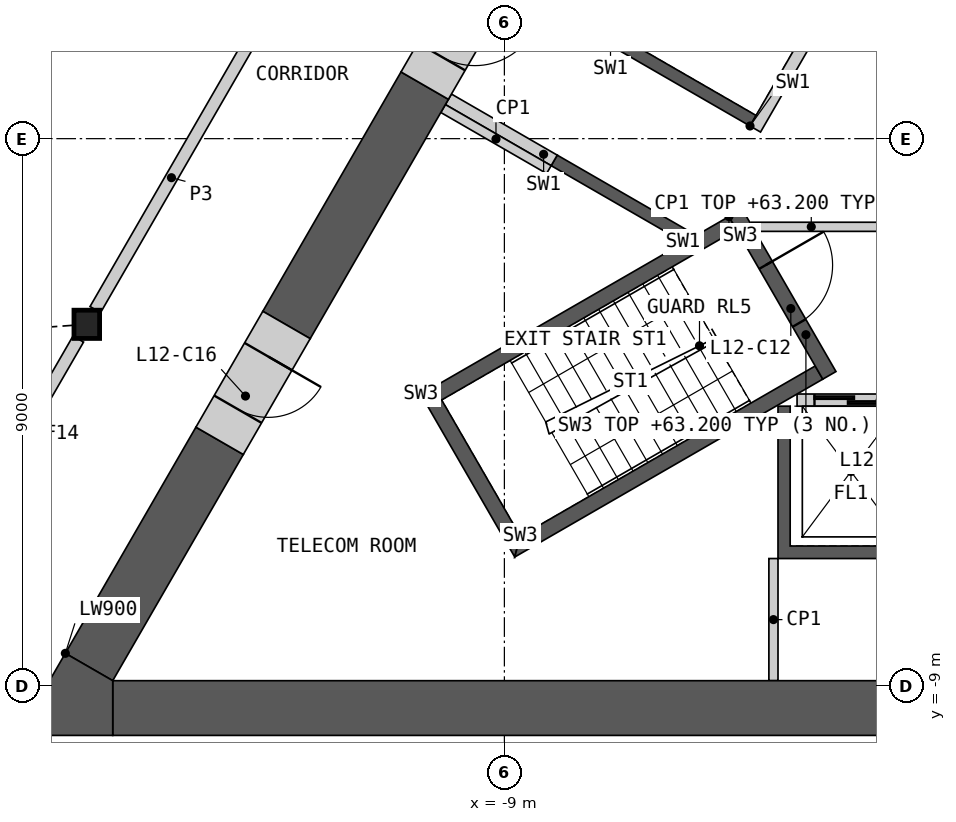
"""IFC4 building model, lengths in metres.
Left out: names, types, materials, properties, quantities, classifications, styles, units other than length and angle.
Written with IfcOpenShell. Run it as: python <this file> out.ifc"""

import sys

from ifc_helpers import new_model, si_unit, direction, frame, frame_2d, origin, origin_2d, place, context, subcontext, project, spatial, polyline, rectangle, i_section, outline, extrude, element, fill, save


model = new_model("IFC4")
c1 = context("Model", 3, precision=1e-05, world=origin(), true_north=direction((0.0, 1.0)))
c2 = subcontext(c1, "Body", "Model", "MODEL_VIEW")
j1 = project(units=[si_unit("LENGTHUNIT", "METRE"), si_unit("PLANEANGLEUNIT", "RADIAN")], contexts=[c1])
p1 = place(None, origin())
s1 = spatial("IfcSite", under=j1, at=p1, CompositionType="ELEMENT")
p2 = place(p1, origin())
s2 = spatial("IfcBuilding", under=s1, at=p2, CompositionType="ELEMENT")
p3 = place(p2, frame((0.0, 0.0, 59.4)))
s3 = spatial("IfcBuildingStorey", under=s2, at=p3, CompositionType="ELEMENT", Elevation=59.4)
p4 = place(p3, frame((-15.868, -3.054, 0.0), z_axis=(0.0, 0.0, 1.0), x_axis=(1.0, 0.0, 0.0)))
e1 = element("IfcColumn", 1, at=p4, inside=s3, PredefinedType="COLUMN", context=c2, shape_type="SweptSolid", body=[
    extrude(i_section(OverallWidth=0.421, OverallDepth=0.465, WebThickness=0.045, FlangeThickness=0.072, at=origin_2d()), origin(), (0.0, 0.0, 1.0), 4.2),
])
p5 = place(p3, origin())
e2 = element("IfcWall", 2, at=p5, inside=s3, PredefinedType="SHEAR", context=c2, shape_type="SweptSolid", body=[
    extrude(outline(polyline([(4.5, -4.4), (4.5, -6.906), (-4.5, -6.906), (-4.5, -4.4), (-4.3, -4.4), (-4.3, -6.7), (-2.3, -6.7), (-2.3, -4.4), (-2.1, -4.4), (-2.1, -6.7), (-0.1, -6.7), (-0.1, -4.4), (0.1, -4.4), (0.1, -6.7), (2.1, -6.7), (2.1, -4.4), (2.3, -4.4), (2.3, -6.7), (4.3, -6.7), (4.3, -4.4), (4.5, -4.4)])), origin(), (0.0, 0.0, 1.0), 3.8),
])
p6 = place(p3, frame((-4.187, -4.3, 0.0), z_axis=(0.0, 0.0, 1.0), x_axis=(1.0, 0.0, 0.0)))
e3 = element("IfcWall", 3, at=p6, inside=s3, PredefinedType="SOLIDWALL", context=c2, shape_type="SweptSolid", body=[
    extrude(rectangle(XDim=8.373, YDim=0.2, at=frame_2d((4.187, 0.0))), origin(), (0.0, 0.0, 1.0), 3.8),
])
p7 = place(p6, frame((0.287, 0.0, 0.0)))
e4 = element("IfcOpeningElement", 4, at=p7, cuts=e3, PredefinedType="OPENING", context=c2, shape_type="SweptSolid", body=[
    extrude(rectangle(XDim=1.2, YDim=2.1, at=frame_2d((0.6, 1.05))), frame((0.0, 0.11, 0.0), z_axis=(0.0, -1.0, 0.0), x_axis=(1.0, 0.0, 0.0)), (0.0, 0.0, 1.0), 0.22),
])
p8 = place(p6, frame((2.387, 0.0, 0.0)))
e5 = element("IfcOpeningElement", 5, at=p8, cuts=e3, PredefinedType="OPENING", context=c2, shape_type="SweptSolid", body=[
    extrude(rectangle(XDim=1.4, YDim=2.1, at=frame_2d((0.7, 1.05))), frame((0.0, 0.11, 0.0), z_axis=(0.0, -1.0, 0.0), x_axis=(1.0, 0.0, 0.0)), (0.0, 0.0, 1.0), 0.22),
])
p9 = place(p6, frame((4.737, 0.0, 0.0)))
e6 = element("IfcOpeningElement", 6, at=p9, cuts=e3, PredefinedType="OPENING", context=c2, shape_type="SweptSolid", body=[
    extrude(rectangle(XDim=1.1, YDim=2.1, at=frame_2d((0.55, 1.05))), frame((0.0, 0.11, 0.0), z_axis=(0.0, -1.0, 0.0), x_axis=(1.0, 0.0, 0.0)), (0.0, 0.0, 1.0), 0.22),
])
p10 = place(p6, frame((6.887, 0.0, 0.0)))
e7 = element("IfcOpeningElement", 7, at=p10, cuts=e3, PredefinedType="OPENING", context=c2, shape_type="SweptSolid", body=[
    extrude(rectangle(XDim=1.2, YDim=2.1, at=frame_2d((0.6, 1.05))), frame((0.0, 0.11, 0.0), z_axis=(0.0, -1.0, 0.0), x_axis=(1.0, 0.0, 0.0)), (0.0, 0.0, 1.0), 0.22),
])
p11 = place(p3, origin())
e8 = element("IfcWall", 8, at=p11, inside=s3, PredefinedType="SHEAR", context=c2, shape_type="SweptSolid", body=[
    extrude(outline(polyline([(-6.061, -1.697), (-8.231, -0.444), (-8.131, -0.271), (-5.96, -1.524), (-6.061, -1.697)])), origin(), (0.0, 0.0, 1.0), 3.8),
])
p12 = place(p3, origin())
e9 = element("IfcWall", 9, at=p12, inside=s3, PredefinedType="SHEAR", context=c2, shape_type="SweptSolid", body=[
    extrude(outline(polyline([(-4.96, 0.208), (-7.131, 1.461), (-5.931, 3.54), (-3.76, 2.287), (-3.861, 2.113), (-5.852, 3.263), (-6.852, 1.531), (-4.861, 0.381), (-4.96, 0.208)])), origin(), (0.0, 0.0, 1.0), 3.8),
])
p13 = place(p3, frame((-1.631, 5.776, 0.0), z_axis=(0.0, 0.0, 1.0), x_axis=(-0.499992876559, -0.866029516466, 0.0)))
e10 = element("IfcWall", 10, at=p13, inside=s3, PredefinedType="SOLIDWALL", context=c2, shape_type="SweptSolid", body=[
    extrude(rectangle(XDim=6.486, YDim=0.2, at=frame_2d((3.243, 0.0))), origin(), (0.0, 0.0, 1.0), 3.8),
])
p14 = place(p13, frame((0.437, 0.0, 0.0)))
e11 = element("IfcOpeningElement", 11, at=p14, cuts=e10, PredefinedType="OPENING", context=c2, shape_type="SweptSolid", body=[
    extrude(rectangle(XDim=0.9, YDim=2.1, at=frame_2d((0.45, 1.05))), frame((0.0, 0.11, 0.0), z_axis=(0.0, -1.0, 0.0), x_axis=(1.0, 0.0, 0.0)), (0.0, 0.0, 1.0), 0.22),
])
p15 = place(p13, frame((2.637, 0.0, 0.0)))
e12 = element("IfcOpeningElement", 12, at=p15, cuts=e10, PredefinedType="OPENING", context=c2, shape_type="SweptSolid", body=[
    extrude(rectangle(XDim=0.9, YDim=2.1, at=frame_2d((0.45, 1.05))), frame((0.0, 0.11, 0.0), z_axis=(0.0, -1.0, 0.0), x_axis=(1.0, 0.0, 0.0)), (0.0, 0.0, 1.0), 0.22),
])
p16 = place(p3, frame((-8.181, -0.357, 0.0), z_axis=(0.0, 0.0, 1.0), x_axis=(-0.866035824272, 0.499981950752, 0.0)))
e13 = element("IfcWall", 13, at=p16, inside=s3, PredefinedType="SHEAR", context=c2, shape_type="SweptSolid", body=[
    extrude(rectangle(XDim=2.009, YDim=0.2, at=frame_2d((1.004, 0.0))), origin(), (0.0, 0.0, 1.0), 3.8),
])
p17 = place(p3, frame((-4.941, -1.45, 0.0), z_axis=(0.0, 0.0, 1.0), x_axis=(1.0, 0.0, 0.0)))
e14 = element("IfcWall", 14, at=p17, inside=s3, PredefinedType="PARTITIONING", context=c2, shape_type="SweptSolid", body=[
    extrude(rectangle(XDim=9.882, YDim=0.15, at=frame_2d((4.941, 0.0))), origin(), (0.0, 0.0, 1.0), 3.8),
])
p18 = place(p17, frame((4.391, 0.0, 0.0)))
e15 = element("IfcOpeningElement", 15, at=p18, cuts=e14, PredefinedType="OPENING", context=c2, shape_type="SweptSolid", body=[
    extrude(rectangle(XDim=1.1, YDim=2.1, at=frame_2d((0.55, 1.05))), frame((0.0, 0.085, 0.0), z_axis=(0.0, -1.0, 0.0), x_axis=(1.0, 0.0, 0.0)), (0.0, 0.0, 1.0), 0.17),
])
p19 = place(p3, origin())
e16 = element("IfcWall", 16, at=p19, inside=s3, PredefinedType="SHEAR", context=c2, shape_type="SweptSolid", body=[
    extrude(outline(polyline([(-5.307, -1.281), (-10.374, -4.206), (-10.032, -4.298), (-5.182, -1.498), (-5.307, -1.281)])), origin(), (0.0, 0.0, 1.0), 3.8),
])
p20 = place(p3, origin())
e17 = element("IfcWall", 17, at=p20, inside=s3, PredefinedType="SHEAR", context=c2, shape_type="SweptSolid", body=[
    extrude(outline(polyline([(-10.374, -4.206), (-8.83, -6.881), (-8.738, -6.539), (-10.032, -4.298), (-10.374, -4.206)])), origin(), (0.0, 0.0, 1.0), 3.8),
])
p21 = place(p3, origin())
e18 = element("IfcWall", 18, at=p21, inside=s3, PredefinedType="SHEAR", context=c2, shape_type="SweptSolid", body=[
    extrude(outline(polyline([(-8.738, -6.539), (-8.83, -6.881), (-3.763, -3.956), (-3.888, -3.739), (-8.738, -6.539)])), origin(), (0.0, 0.0, 1.0), 3.8),
])
p22 = place(p3, frame((-5.199, -1.219, 0.0), z_axis=(0.0, 0.0, 1.0), x_axis=(0.499982516597, -0.866035497597, 0.0)))
e19 = element("IfcWall", 19, at=p22, inside=s3, PredefinedType="SHEAR", context=c2, shape_type="SweptSolid", body=[
    extrude(rectangle(XDim=3.088, YDim=0.25, at=frame_2d((1.544, 0.0))), origin(), (0.0, 0.0, 1.0), 3.8),
])
p23 = place(p22, frame((0.994, 0.0, 0.0)))
e20 = element("IfcOpeningElement", 20, at=p23, cuts=e19, PredefinedType="OPENING", context=c2, shape_type="SweptSolid", body=[
    extrude(rectangle(XDim=1.1, YDim=2.1, at=frame_2d((0.55, 1.05))), frame((0.0, 0.135, 0.0), z_axis=(0.0, -1.0, 0.0), x_axis=(1.0, 0.0, 0.0)), (0.0, 0.0, 1.0), 0.27),
])
p24 = place(p3, frame((-4.575, -6.906, 0.0), z_axis=(0.0, 0.0, 1.0), x_axis=(0.0, -1.0, 0.0)))
e21 = element("IfcWall", 21, at=p24, inside=s3, PredefinedType="PARTITIONING", context=c2, shape_type="SweptSolid", body=[
    extrude(rectangle(XDim=2.009, YDim=0.15, at=frame_2d((1.004, 0.0))), origin(), (0.0, 0.0, 1.0), 3.8),
])
p25 = place(p3, frame((-8.268, -0.509, 0.0), z_axis=(0.0, 0.0, 1.0), x_axis=(-0.866035824272, 0.499981950752, 0.0)))
e22 = element("IfcWall", 22, at=p25, inside=s3, PredefinedType="PARTITIONING", context=c2, shape_type="SweptSolid", body=[
    extrude(rectangle(XDim=2.009, YDim=0.15, at=frame_2d((1.004, 0.0))), origin(), (0.0, 0.0, 1.0), 3.8),
])
p26 = place(p3, frame((-15.441, -9.365, 0.0), z_axis=(0.0, 0.0, 1.0), x_axis=(1.0, 0.0, 0.0)))
e23 = element("IfcWall", 23, at=p26, inside=s3, PredefinedType="SHEAR", context=c2, shape_type="SweptSolid", body=[
    extrude(rectangle(XDim=14.341, YDim=0.9, at=frame_2d((7.17, 0.0))), origin(), (0.0, 0.0, 1.0), 3.8),
])
p27 = place(p3, frame((-10.31, 0.872, 0.0), z_axis=(0.0, 0.0, 1.0), x_axis=(-0.499968858743, -0.866043382451, 0.0)))
e24 = element("IfcWall", 24, at=p27, inside=s3, PredefinedType="SHEAR", context=c2, shape_type="SweptSolid", body=[
    extrude(rectangle(XDim=4.546, YDim=0.9, at=frame_2d((2.273, 0.0))), origin(), (0.0, 0.0, 1.0), 3.8),
])
p28 = place(p3, frame((-13.683, -4.97, 0.0), z_axis=(0.0, 0.0, 1.0), x_axis=(-0.499996331799, -0.866027521611, 0.0)))
e25 = element("IfcWall", 25, at=p28, inside=s3, PredefinedType="SHEAR", context=c2, shape_type="SweptSolid", body=[
    extrude(rectangle(XDim=4.295, YDim=0.9, at=frame_2d((2.148, 0.0))), origin(), (0.0, 0.0, 1.0), 3.8),
])
p29 = place(p3, origin())
e26 = element("IfcWall", 26, at=p29, inside=s3, PredefinedType="SHEAR", context=c2, shape_type="SweptSolid", body=[
    extrude(outline(polyline([(-16.221, -8.465), (-15.441, -8.915), (-15.441, -9.815), (-17.0, -9.815), (-16.221, -8.465)])), origin(), (0.0, 0.0, 1.0), 3.8),
])
p30 = place(p3, frame((-12.583, -3.065, 0.0), z_axis=(0.0, 0.0, 1.0), x_axis=(-0.50002983664, -0.866008176907, 0.0)))
e27 = element("IfcWall", 27, at=p30, inside=s3, PredefinedType="SHEAR", context=c2, shape_type="SweptSolid", body=[
    extrude(rectangle(XDim=2.2, YDim=0.9, at=frame_2d((1.1, 0.0))), origin(), (0.0, 0.0, 1.0), 3.8),
])
p31 = place(p30, frame((0.6, 0.0, 0.0)))
e28 = element("IfcOpeningElement", 28, at=p31, cuts=e27, PredefinedType="OPENING", context=c2, shape_type="SweptSolid", body=[
    extrude(rectangle(XDim=1.0, YDim=2.1, at=frame_2d((0.5, 1.05))), frame((0.0, 0.46, 0.0), z_axis=(0.0, -1.0, 0.0), x_axis=(1.0, 0.0, 0.0)), (0.0, 0.0, 1.0), 0.92),
])
p32 = place(p3, frame((-9.21, 2.777, 0.0), z_axis=(0.0, 0.0, 1.0), x_axis=(-0.500077893725, -0.86598042715, 0.0)))
e29 = element("IfcWall", 29, at=p32, inside=s3, PredefinedType="SHEAR", context=c2, shape_type="SweptSolid", body=[
    extrude(rectangle(XDim=2.2, YDim=0.9, at=frame_2d((1.1, 0.0))), origin(), (0.0, 0.0, 1.0), 3.8),
])
p33 = place(p32, frame((0.55, 0.0, 0.0)))
e30 = element("IfcOpeningElement", 30, at=p33, cuts=e29, PredefinedType="OPENING", context=c2, shape_type="SweptSolid", body=[
    extrude(rectangle(XDim=1.1, YDim=2.1, at=frame_2d((0.55, 1.05))), frame((0.0, 0.46, 0.0), z_axis=(0.0, -1.0, 0.0), x_axis=(1.0, 0.0, 0.0)), (0.0, 0.0, 1.0), 0.92),
])
p34 = place(p3, frame((-15.728, -2.811, 0.0), z_axis=(0.0, 0.0, 1.0), x_axis=(0.49999175339, 0.866030164915, 0.0)))
e31 = element("IfcWall", 31, at=p34, inside=s3, PredefinedType="PARTITIONING", context=c2, shape_type="SweptSolid", body=[
    extrude(rectangle(XDim=10.019, YDim=0.2, at=frame_2d((5.009, 0.0))), origin(), (0.0, 0.0, 1.0), 3.8),
])
p35 = place(p34, frame((7.266, 0.0, 0.0)))
e32 = element("IfcOpeningElement", 32, at=p35, cuts=e31, PredefinedType="OPENING", context=c2, shape_type="SweptSolid", body=[
    extrude(rectangle(XDim=1.0, YDim=2.1, at=frame_2d((0.5, 1.05))), frame((0.0, 0.11, 0.0), z_axis=(0.0, -1.0, 0.0), x_axis=(1.0, 0.0, 0.0)), (0.0, 0.0, 1.0), 0.22),
])
p36 = place(p3, frame((-19.244, -8.902, 0.0), z_axis=(0.0, 0.0, 1.0), x_axis=(0.499984737558, 0.86603421538, 0.0)))
e33 = element("IfcWall", 33, at=p36, inside=s3, PredefinedType="PARTITIONING", context=c2, shape_type="SweptSolid", body=[
    extrude(rectangle(XDim=6.473, YDim=0.2, at=frame_2d((3.236, 0.0))), origin(), (0.0, 0.0, 1.0), 3.8),
])
p37 = place(p36, frame((2.387, 0.0, 0.0)))
e34 = element("IfcOpeningElement", 34, at=p37, cuts=e33, PredefinedType="OPENING", context=c2, shape_type="SweptSolid", body=[
    extrude(rectangle(XDim=1.8, YDim=2.1, at=frame_2d((0.9, 1.05))), frame((0.0, 0.11, 0.0), z_axis=(0.0, -1.0, 0.0), x_axis=(1.0, 0.0, 0.0)), (0.0, 0.0, 1.0), 0.22),
])
p38 = place(p7, origin())
e35 = element("IfcDoor", 35, at=p38, inside=s3, OperationType="SLIDING_TO_LEFT", PredefinedType="DOOR", context=c2, shape_type="SweptSolid", body=[
    extrude(rectangle(XDim=1.2, YDim=2.1, at=frame_2d((0.6, 1.05))), frame((0.0, 0.025, 0.0), z_axis=(0.0, -1.0, 0.0), x_axis=(1.0, 0.0, 0.0)), (0.0, 0.0, 1.0), 0.05),
])
fill(e4, e35)
p39 = place(p23, origin())
e36 = element("IfcDoor", 36, at=p39, inside=s3, OperationType="SINGLE_SWING_LEFT", PredefinedType="DOOR", context=c2, shape_type="SweptSolid", body=[
    extrude(rectangle(XDim=1.1, YDim=2.1, at=frame_2d((0.55, 1.05))), frame((0.0, 0.025, 0.0), z_axis=(0.0, -1.0, 0.0), x_axis=(1.0, 0.0, 0.0)), (0.0, 0.0, 1.0), 0.05),
])
fill(e20, e36)
p40 = place(p31, origin())
e37 = element("IfcDoor", 37, at=p40, inside=s3, OperationType="SINGLE_SWING_LEFT", PredefinedType="DOOR", context=c2, shape_type="SweptSolid", body=[
    extrude(rectangle(XDim=1.0, YDim=2.1, at=frame_2d((0.5, 1.05))), frame((0.0, 0.205, 0.0), z_axis=(0.0, -1.0, 0.0), x_axis=(1.0, 0.0, 0.0)), (0.0, 0.0, 1.0), 0.05),
])
fill(e28, e37)
p41 = place(p33, origin())
e38 = element("IfcDoor", 38, at=p41, inside=s3, OperationType="SINGLE_SWING_LEFT", PredefinedType="DOOR", context=c2, shape_type="SweptSolid", body=[
    extrude(rectangle(XDim=1.1, YDim=2.1, at=frame_2d((0.55, 1.05))), frame((0.0, 0.205, 0.0), z_axis=(0.0, -1.0, 0.0), x_axis=(1.0, 0.0, 0.0)), (0.0, 0.0, 1.0), 0.05),
])
fill(e30, e38)
save(model, sys.argv[1])
